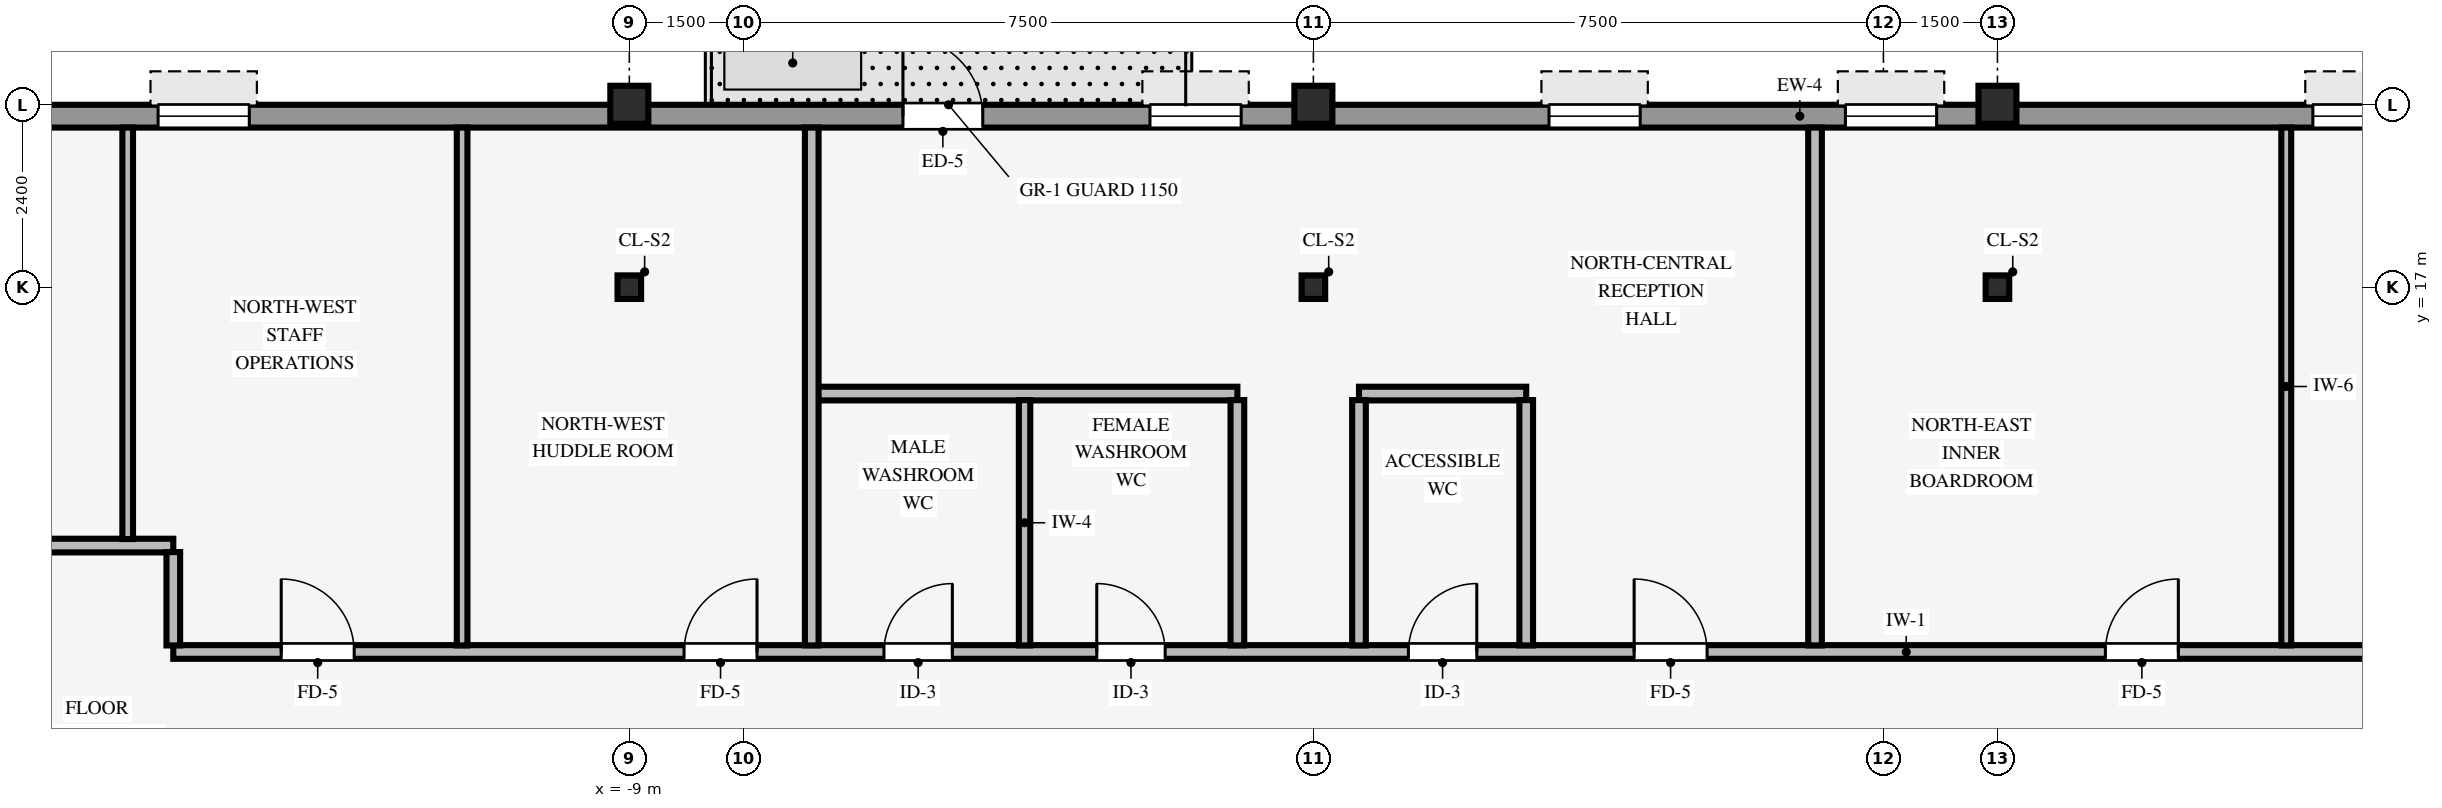
"""IFC4 building model, lengths in metres.
Left out: names, types, materials, properties, quantities, classifications, styles, units other than length and angle.
Written with IfcOpenShell. Run it as: python <this file> out.ifc"""

import sys

from ifc_helpers import new_model, si_unit, direction, frame, frame_2d, origin, origin_2d, place, context, subcontext, project, spatial, rectangle, hollow_rectangle, i_section, extrude, source, transform, mapped, element, fill, save


model = new_model("IFC4")
c1 = context("Model", 3, precision=1e-05, world=origin(), true_north=direction((0.0, 1.0)))
c2 = subcontext(c1, "Body", "Model", "MODEL_VIEW")
j1 = project(units=[si_unit("LENGTHUNIT", "METRE"), si_unit("PLANEANGLEUNIT", "RADIAN")], contexts=[c1])
p1 = place(None, origin())
s1 = spatial("IfcSite", under=j1, at=p1, CompositionType="ELEMENT")
p2 = place(p1, origin())
s2 = spatial("IfcBuilding", under=s1, at=p2, CompositionType="ELEMENT")
p3 = place(p2, frame((0.0, 0.0, 268.9)))
s3 = spatial("IfcBuildingStorey", under=s2, at=p3, CompositionType="ELEMENT", Elevation=268.9)
for number, where, z_axis, x_axis in (
    (1, (-9.0, 19.4, 0.0), (0.0, 0.0, 1.0), (1.0, 0.0, 0.0)),
    (2, (0.0, 19.4, 0.0), (0.0, 0.0, 1.0), (1.0, 0.0, 0.0)),
    (3, (9.0, 19.4, 0.0), (0.0, 0.0, 1.0), (1.0, 0.0, 0.0)),
):
    element("IfcColumn", number, at=place(p3, frame(where, z_axis=z_axis, x_axis=x_axis)), inside=s3, PredefinedType="COLUMN", context=c2, shape_type="SweptSolid", body=[
        extrude(hollow_rectangle(XDim=0.5, YDim=0.5, WallThickness=0.032, InnerFilletRadius=0.032, OuterFilletRadius=0.064, at=origin_2d()), origin(), (0.0, 0.0, 1.0), 3.37),
    ])
for number, where, z_axis, x_axis in (
    (4, (0.0, 17.0, 0.0), (0.0, 0.0, 1.0), (1.0, 0.0, 0.0)),
    (5, (-9.0, 17.0, 0.0), (0.0, 0.0, 1.0), (1.0, 0.0, 0.0)),
    (6, (9.0, 17.0, 0.0), (0.0, 0.0, 1.0), (1.0, 0.0, 0.0)),
):
    element("IfcColumn", number, at=place(p3, frame(where, z_axis=z_axis, x_axis=x_axis)), inside=s3, PredefinedType="COLUMN", context=c2, shape_type="SweptSolid", body=[
        extrude(i_section(OverallWidth=0.31, OverallDepth=0.31, WebThickness=0.015, FlangeThickness=0.015, FilletRadius=0.015, at=origin_2d()), origin(), (0.0, 0.0, 1.0), 3.37),
    ])
p4 = place(p3, frame((-18.9, 19.25, 0.0), z_axis=(0.0, 0.0, 1.0), x_axis=(1.0, 0.0, 0.0)))
e7 = element("IfcWall", 7, at=p4, inside=s3, PredefinedType="STANDARD", context=c2, shape_type="SweptSolid", body=[
    extrude(rectangle(XDim=35.6, YDim=0.3, at=frame_2d((17.8, 0.0))), origin(), (0.0, 0.0, 1.0), 2.705),
])
p5 = place(p4, frame((13.5, 0.0, 0.0)))
e8 = element("IfcOpeningElement", 8, at=p5, cuts=e7, PredefinedType="OPENING", context=c2, shape_type="SweptSolid", body=[
    extrude(rectangle(XDim=1.05, YDim=2.1, at=frame_2d((0.525, 1.05))), frame((0.0, 0.16, 0.0), z_axis=(0.0, -1.0, 0.0), x_axis=(1.0, 0.0, 0.0)), (0.0, 0.0, 1.0), 0.32),
])
p6 = place(p4, frame((3.7, 0.0, 0.8)))
e9 = element("IfcOpeningElement", 9, at=p6, cuts=e7, PredefinedType="OPENING", context=c2, shape_type="SweptSolid", body=[
    extrude(rectangle(XDim=1.2, YDim=1.48, at=frame_2d((0.6, 0.74))), frame((0.0, 0.16, 0.0), z_axis=(0.0, -1.0, 0.0), x_axis=(1.0, 0.0, 0.0)), (0.0, 0.0, 1.0), 0.32),
])
p7 = place(p4, frame((16.75, 0.0, 0.8)))
e10 = element("IfcOpeningElement", 10, at=p7, cuts=e7, PredefinedType="OPENING", context=c2, shape_type="SweptSolid", body=[
    extrude(rectangle(XDim=1.2, YDim=1.48, at=frame_2d((0.6, 0.74))), frame((0.0, 0.16, 0.0), z_axis=(0.0, -1.0, 0.0), x_axis=(1.0, 0.0, 0.0)), (0.0, 0.0, 1.0), 0.32),
])
p8 = place(p4, frame((22.0, 0.0, 0.8)))
e11 = element("IfcOpeningElement", 11, at=p8, cuts=e7, PredefinedType="OPENING", context=c2, shape_type="SweptSolid", body=[
    extrude(rectangle(XDim=1.2, YDim=1.48, at=frame_2d((0.6, 0.74))), frame((0.0, 0.16, 0.0), z_axis=(0.0, -1.0, 0.0), x_axis=(1.0, 0.0, 0.0)), (0.0, 0.0, 1.0), 0.32),
])
p9 = place(p4, frame((25.9, 0.0, 0.8)))
e12 = element("IfcOpeningElement", 12, at=p9, cuts=e7, PredefinedType="OPENING", context=c2, shape_type="SweptSolid", body=[
    extrude(rectangle(XDim=1.2, YDim=1.48, at=frame_2d((0.6, 0.74))), frame((0.0, 0.16, 0.0), z_axis=(0.0, -1.0, 0.0), x_axis=(1.0, 0.0, 0.0)), (0.0, 0.0, 1.0), 0.32),
])
p10 = place(p4, frame((32.05, 0.0, 0.8)))
e13 = element("IfcOpeningElement", 13, at=p10, cuts=e7, PredefinedType="OPENING", context=c2, shape_type="SweptSolid", body=[
    extrude(rectangle(XDim=1.2, YDim=1.48, at=frame_2d((0.6, 0.74))), frame((0.0, 0.16, 0.0), z_axis=(0.0, -1.0, 0.0), x_axis=(1.0, 0.0, 0.0)), (0.0, 0.0, 1.0), 0.32),
])
p11 = place(p3, frame((-15.0, 12.2, 0.0), z_axis=(0.0, 0.0, 1.0), x_axis=(1.0, 0.0, 0.0)))
e14 = element("IfcWall", 14, at=p11, inside=s3, PredefinedType="PARTITIONING", context=c2, shape_type="SweptSolid", body=[
    extrude(rectangle(XDim=30.8, YDim=0.18, at=frame_2d((15.4, 0.0))), origin(), (0.0, 0.0, 1.0), 3.36),
])
p12 = place(p11, frame((1.42, 0.0, 0.0)))
e15 = element("IfcOpeningElement", 15, at=p12, cuts=e14, PredefinedType="OPENING", context=c2, shape_type="SweptSolid", body=[
    extrude(rectangle(XDim=0.96, YDim=2.1, at=frame_2d((0.48, 1.05))), frame((0.0, 0.1, 0.0), z_axis=(0.0, -1.0, 0.0), x_axis=(1.0, 0.0, 0.0)), (0.0, 0.0, 1.0), 0.2),
])
p13 = place(p11, frame((25.42, 0.0, 0.0)))
e16 = element("IfcOpeningElement", 16, at=p13, cuts=e14, PredefinedType="OPENING", context=c2, shape_type="SweptSolid", body=[
    extrude(rectangle(XDim=0.96, YDim=2.1, at=frame_2d((0.48, 1.05))), frame((0.0, 0.1, 0.0), z_axis=(0.0, -1.0, 0.0), x_axis=(1.0, 0.0, 0.0)), (0.0, 0.0, 1.0), 0.2),
])
p14 = place(p11, frame((19.22, 0.0, 0.0)))
e17 = element("IfcOpeningElement", 17, at=p14, cuts=e14, PredefinedType="OPENING", context=c2, shape_type="SweptSolid", body=[
    extrude(rectangle(XDim=0.96, YDim=2.1, at=frame_2d((0.48, 1.05))), frame((0.0, 0.1, 0.0), z_axis=(0.0, -1.0, 0.0), x_axis=(1.0, 0.0, 0.0)), (0.0, 0.0, 1.0), 0.2),
])
p15 = place(p11, frame((28.82, 0.0, 0.0)))
e18 = element("IfcOpeningElement", 18, at=p15, cuts=e14, PredefinedType="OPENING", context=c2, shape_type="SweptSolid", body=[
    extrude(rectangle(XDim=0.96, YDim=2.1, at=frame_2d((0.48, 1.05))), frame((0.0, 0.1, 0.0), z_axis=(0.0, -1.0, 0.0), x_axis=(1.0, 0.0, 0.0)), (0.0, 0.0, 1.0), 0.2),
])
p16 = place(p11, frame((9.35, 0.0, 0.0)))
e19 = element("IfcOpeningElement", 19, at=p16, cuts=e14, PredefinedType="OPENING", context=c2, shape_type="SweptSolid", body=[
    extrude(rectangle(XDim=0.9, YDim=2.1, at=frame_2d((0.45, 1.05))), frame((0.0, 0.1, 0.0), z_axis=(0.0, -1.0, 0.0), x_axis=(1.0, 0.0, 0.0)), (0.0, 0.0, 1.0), 0.2),
])
p17 = place(p11, frame((12.15, 0.0, 0.0)))
e20 = element("IfcOpeningElement", 20, at=p17, cuts=e14, PredefinedType="OPENING", context=c2, shape_type="SweptSolid", body=[
    extrude(rectangle(XDim=0.9, YDim=2.1, at=frame_2d((0.45, 1.05))), frame((0.0, 0.1, 0.0), z_axis=(0.0, -1.0, 0.0), x_axis=(1.0, 0.0, 0.0)), (0.0, 0.0, 1.0), 0.2),
])
p18 = place(p11, frame((6.72, 0.0, 0.0)))
e21 = element("IfcOpeningElement", 21, at=p18, cuts=e14, PredefinedType="OPENING", context=c2, shape_type="SweptSolid", body=[
    extrude(rectangle(XDim=0.96, YDim=2.1, at=frame_2d((0.48, 1.05))), frame((0.0, 0.1, 0.0), z_axis=(0.0, -1.0, 0.0), x_axis=(1.0, 0.0, 0.0)), (0.0, 0.0, 1.0), 0.2),
])
p19 = place(p11, frame((16.25, 0.0, 0.0)))
e22 = element("IfcOpeningElement", 22, at=p19, cuts=e14, PredefinedType="OPENING", context=c2, shape_type="SweptSolid", body=[
    extrude(rectangle(XDim=0.9, YDim=2.1, at=frame_2d((0.45, 1.05))), frame((0.0, 0.1, 0.0), z_axis=(0.0, -1.0, 0.0), x_axis=(1.0, 0.0, 0.0)), (0.0, 0.0, 1.0), 0.2),
])
p20 = place(p3, frame((-20.0, 13.6, 0.0), z_axis=(0.0, 0.0, 1.0), x_axis=(1.0, 0.0, 0.0)))
e23 = element("IfcWall", 23, at=p20, inside=s3, PredefinedType="PARTITIONING", context=c2, shape_type="SweptSolid", body=[
    extrude(rectangle(XDim=5.0, YDim=0.18, at=frame_2d((2.5, 0.0))), origin(), (0.0, 0.0, 1.0), 3.038),
])
p21 = place(p20, frame((1.72, 0.0, 0.0)))
e24 = element("IfcOpeningElement", 24, at=p21, cuts=e23, PredefinedType="OPENING", context=c2, shape_type="SweptSolid", body=[
    extrude(rectangle(XDim=0.96, YDim=2.1, at=frame_2d((0.48, 1.05))), frame((0.0, 0.1, 0.0), z_axis=(0.0, -1.0, 0.0), x_axis=(1.0, 0.0, 0.0)), (0.0, 0.0, 1.0), 0.2),
])
p22 = place(p3, frame((-6.529, 15.6, 0.0), z_axis=(0.0, 0.0, 1.0), x_axis=(1.0, 0.0, 0.0)))
e25 = element("IfcWall", 25, at=p22, inside=s3, PredefinedType="PARTITIONING", context=c2, shape_type="SweptSolid", body=[
    extrude(rectangle(XDim=5.529, YDim=0.18, at=frame_2d((2.765, 0.0))), origin(), (0.0, 0.0, 1.0), 3.36),
])
p23 = place(p3, frame((0.6, 15.6, 0.0), z_axis=(0.0, 0.0, 1.0), x_axis=(1.0, 0.0, 0.0)))
e26 = element("IfcWall", 26, at=p23, inside=s3, PredefinedType="PARTITIONING", context=c2, shape_type="SweptSolid", body=[
    extrude(rectangle(XDim=2.2, YDim=0.18, at=frame_2d((1.1, 0.0))), origin(), (0.0, 0.0, 1.0), 3.36),
])
p24 = place(p3, frame((-15.6, 13.686, 0.0), z_axis=(0.0, 0.0, 1.0), x_axis=(0.0, 1.0, 0.0)))
e27 = element("IfcWall", 27, at=p24, inside=s3, PredefinedType="PARTITIONING", context=c2, shape_type="SweptSolid", body=[
    extrude(rectangle(XDim=5.414, YDim=0.14, at=frame_2d((2.707, 0.0))), origin(), (0.0, 0.0, 1.0), 3.36),
])
p25 = place(p3, frame((-15.0, 12.286, 0.0), z_axis=(0.0, 0.0, 1.0), x_axis=(0.0, 1.0, 0.0)))
e28 = element("IfcWall", 28, at=p25, inside=s3, PredefinedType="PARTITIONING", context=c2, shape_type="SweptSolid", body=[
    extrude(rectangle(XDim=1.228, YDim=0.18, at=frame_2d((0.614, 0.0))), origin(), (0.0, 0.0, 1.0), 3.36),
])
p26 = place(p3, frame((-11.2, 12.286, 0.0), z_axis=(0.0, 0.0, 1.0), x_axis=(0.0, 1.0, 0.0)))
e29 = element("IfcWall", 29, at=p26, inside=s3, PredefinedType="PARTITIONING", context=c2, shape_type="SweptSolid", body=[
    extrude(rectangle(XDim=6.814, YDim=0.14, at=frame_2d((3.407, 0.0))), origin(), (0.0, 0.0, 1.0), 3.36),
])
p27 = place(p3, frame((-6.6, 12.286, 0.0), z_axis=(0.0, 0.0, 1.0), x_axis=(0.0, 1.0, 0.0)))
e30 = element("IfcWall", 30, at=p27, inside=s3, PredefinedType="PARTITIONING", context=c2, shape_type="SweptSolid", body=[
    extrude(rectangle(XDim=6.814, YDim=0.18, at=frame_2d((3.407, 0.0))), origin(), (0.0, 0.0, 1.0), 3.36),
])
p28 = place(p3, frame((-3.8, 12.286, 0.0), z_axis=(0.0, 0.0, 1.0), x_axis=(0.0, 1.0, 0.0)))
e31 = element("IfcWall", 31, at=p28, inside=s3, PredefinedType="PARTITIONING", context=c2, shape_type="SweptSolid", body=[
    extrude(rectangle(XDim=3.228, YDim=0.15, at=frame_2d((1.614, 0.0))), origin(), (0.0, 0.0, 1.0), 3.36),
])
for number, where, z_axis, x_axis in (
    (32, (-1.0, 12.286, 0.0), (0.0, 0.0, 1.0), (0.0, 1.0, 0.0)),
    (33, (0.6, 12.286, 0.0), (0.0, 0.0, 1.0), (0.0, 1.0, 0.0)),
    (34, (2.8, 12.286, 0.0), (0.0, 0.0, 1.0), (0.0, 1.0, 0.0)),
):
    element("IfcWall", number, at=place(p3, frame(where, z_axis=z_axis, x_axis=x_axis)), inside=s3, PredefinedType="PARTITIONING", context=c2, shape_type="SweptSolid", body=[
        extrude(rectangle(XDim=3.228, YDim=0.18, at=frame_2d((1.614, 0.0))), origin(), (0.0, 0.0, 1.0), 3.36),
    ])
p29 = place(p3, frame((6.6, 12.286, 0.0), z_axis=(0.0, 0.0, 1.0), x_axis=(0.0, 1.0, 0.0)))
e35 = element("IfcWall", 35, at=p29, inside=s3, PredefinedType="PARTITIONING", context=c2, shape_type="SweptSolid", body=[
    extrude(rectangle(XDim=6.814, YDim=0.18, at=frame_2d((3.407, 0.0))), origin(), (0.0, 0.0, 1.0), 3.36),
])
p30 = place(p3, frame((12.8, 12.286, 0.0), z_axis=(0.0, 0.0, 1.0), x_axis=(0.0, 1.0, 0.0)))
e36 = element("IfcWall", 36, at=p30, inside=s3, PredefinedType="PARTITIONING", context=c2, shape_type="SweptSolid", body=[
    extrude(rectangle(XDim=6.814, YDim=0.13, at=frame_2d((3.407, 0.0))), origin(), (0.0, 0.0, 1.0), 3.36),
])
m1 = source(origin(), c2, "Body", "SweptSolid", [
    extrude(rectangle(XDim=1.05, YDim=2.1, at=frame_2d((0.525, 1.05))), frame((0.0, 0.025, 0.0), z_axis=(0.0, -1.0, 0.0), x_axis=(1.0, 0.0, 0.0)), (0.0, 0.0, 1.0), 0.05),
])
p31 = place(p5, origin())
e37 = element("IfcDoor", 37, at=p31, inside=s3, OperationType="SINGLE_SWING_LEFT", PredefinedType="DOOR", context=c2, shape_type="MappedRepresentation", body=[
    mapped(m1, transform((0.0, 0.0, 0.0), scale=1.0)),
])
fill(e8, e37)
m2 = source(origin(), c2, "Body", "SweptSolid", [
    extrude(rectangle(XDim=1.2, YDim=1.48, at=frame_2d((0.6, 0.74))), frame((0.0, 0.03, 0.0), z_axis=(0.0, -1.0, 0.0), x_axis=(1.0, 0.0, 0.0)), (0.0, 0.0, 1.0), 0.06),
])
p32 = place(p6, origin())
e38 = element("IfcWindow", 38, at=p32, inside=s3, PartitioningType="SINGLE_PANEL", PredefinedType="WINDOW", context=c2, shape_type="MappedRepresentation", body=[
    mapped(m2, transform((0.0, 0.0, 0.0), scale=1.0)),
])
fill(e9, e38)
p33 = place(p7, origin())
e39 = element("IfcWindow", 39, at=p33, inside=s3, PartitioningType="SINGLE_PANEL", PredefinedType="WINDOW", context=c2, shape_type="MappedRepresentation", body=[
    mapped(m2, transform((0.0, 0.0, 0.0), scale=1.0)),
])
fill(e10, e39)
p34 = place(p8, origin())
e40 = element("IfcWindow", 40, at=p34, inside=s3, PartitioningType="SINGLE_PANEL", PredefinedType="WINDOW", context=c2, shape_type="MappedRepresentation", body=[
    mapped(m2, transform((0.0, 0.0, 0.0), scale=1.0)),
])
fill(e11, e40)
p35 = place(p9, origin())
e41 = element("IfcWindow", 41, at=p35, inside=s3, PartitioningType="SINGLE_PANEL", PredefinedType="WINDOW", context=c2, shape_type="MappedRepresentation", body=[
    mapped(m2, transform((0.0, 0.0, 0.0), scale=1.0)),
])
fill(e12, e41)
p36 = place(p10, origin())
e42 = element("IfcWindow", 42, at=p36, inside=s3, PartitioningType="SINGLE_PANEL", PredefinedType="WINDOW", context=c2, shape_type="MappedRepresentation", body=[
    mapped(m2, transform((0.0, 0.0, 0.0), scale=1.0)),
])
fill(e13, e42)
m3 = source(origin(), c2, "Body", "SweptSolid", [
    extrude(rectangle(XDim=0.96, YDim=2.1, at=frame_2d((0.48, 1.05))), frame((0.0, 0.025, 0.0), z_axis=(0.0, -1.0, 0.0), x_axis=(1.0, 0.0, 0.0)), (0.0, 0.0, 1.0), 0.05),
])
p37 = place(p12, origin())
e43 = element("IfcDoor", 43, at=p37, inside=s3, OperationType="SINGLE_SWING_LEFT", PredefinedType="DOOR", context=c2, shape_type="MappedRepresentation", body=[
    mapped(m3, transform((0.0, 0.0, 0.0), scale=1.0)),
])
fill(e15, e43)
p38 = place(p13, origin())
e44 = element("IfcDoor", 44, at=p38, inside=s3, OperationType="SINGLE_SWING_RIGHT", PredefinedType="DOOR", context=c2, shape_type="MappedRepresentation", body=[
    mapped(m3, transform((0.0, 0.0, 0.0), scale=1.0)),
])
fill(e16, e44)
p39 = place(p14, origin())
e45 = element("IfcDoor", 45, at=p39, inside=s3, OperationType="SINGLE_SWING_LEFT", PredefinedType="DOOR", context=c2, shape_type="MappedRepresentation", body=[
    mapped(m3, transform((0.0, 0.0, 0.0), scale=1.0)),
])
fill(e17, e45)
m4 = source(origin(), c2, "Body", "SweptSolid", [
    extrude(rectangle(XDim=0.9, YDim=2.1, at=frame_2d((0.45, 1.05))), frame((0.0, 0.025, 0.0), z_axis=(0.0, -1.0, 0.0), x_axis=(1.0, 0.0, 0.0)), (0.0, 0.0, 1.0), 0.05),
])
p40 = place(p16, origin())
e46 = element("IfcDoor", 46, at=p40, inside=s3, OperationType="SINGLE_SWING_RIGHT", PredefinedType="DOOR", context=c2, shape_type="MappedRepresentation", body=[
    mapped(m4, transform((0.0, 0.0, 0.0), scale=1.0)),
])
fill(e19, e46)
p41 = place(p17, origin())
e47 = element("IfcDoor", 47, at=p41, inside=s3, OperationType="SINGLE_SWING_LEFT", PredefinedType="DOOR", context=c2, shape_type="MappedRepresentation", body=[
    mapped(m4, transform((0.0, 0.0, 0.0), scale=1.0)),
])
fill(e20, e47)
p42 = place(p18, origin())
e48 = element("IfcDoor", 48, at=p42, inside=s3, OperationType="SINGLE_SWING_RIGHT", PredefinedType="DOOR", context=c2, shape_type="MappedRepresentation", body=[
    mapped(m3, transform((0.0, 0.0, 0.0), scale=1.0)),
])
fill(e21, e48)
p43 = place(p19, origin())
e49 = element("IfcDoor", 49, at=p43, inside=s3, OperationType="SINGLE_SWING_RIGHT", PredefinedType="DOOR", context=c2, shape_type="MappedRepresentation", body=[
    mapped(m4, transform((0.0, 0.0, 0.0), scale=1.0)),
])
fill(e22, e49)
save(model, sys.argv[1])
